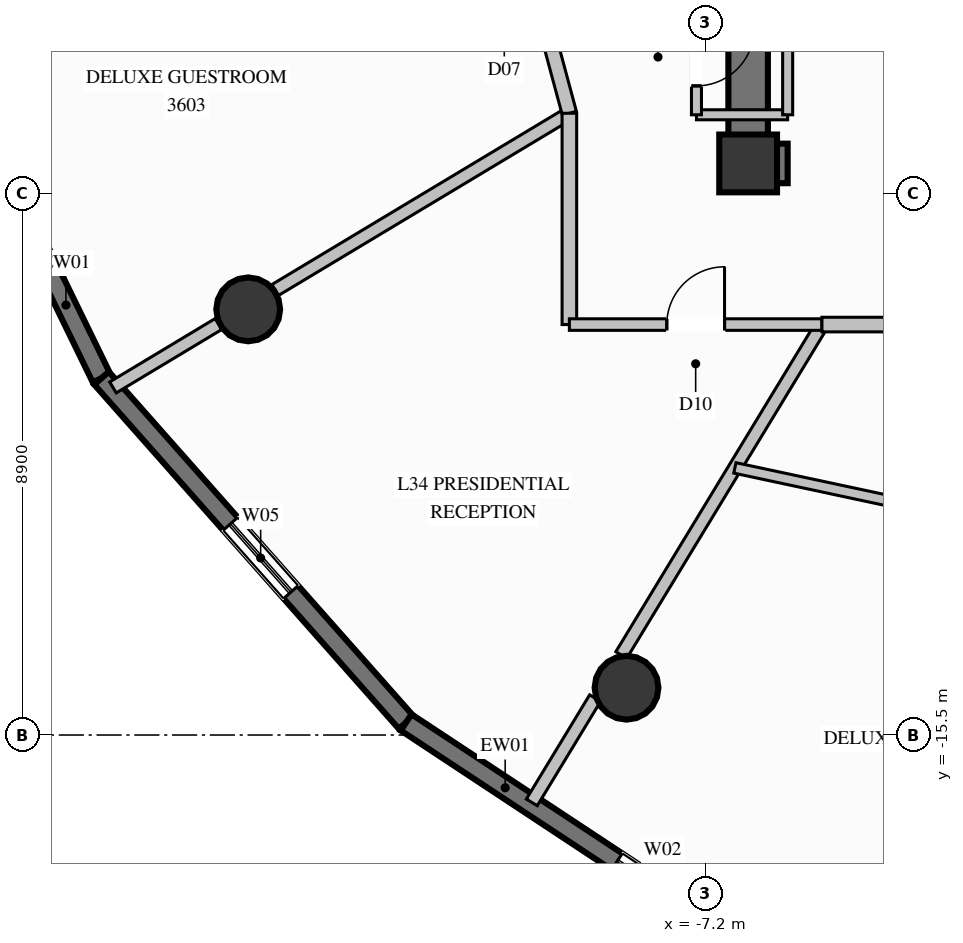
"""IFC4 building model, lengths in metres.
Left out: names, types, materials, properties, quantities, classifications, styles, units other than length and angle.
Written with IfcOpenShell. Run it as: python <this file> out.ifc"""

import sys

from ifc_helpers import new_model, si_unit, direction, frame, frame_2d, origin, origin_2d, place, context, subcontext, project, spatial, rectangle, circle, extrude, element, fill, save


model = new_model("IFC4")
c1 = context("Model", 3, precision=1e-05, world=origin(), true_north=direction((0.0, 1.0)))
c2 = subcontext(c1, "Body", "Model", "MODEL_VIEW")
j1 = project(units=[si_unit("LENGTHUNIT", "METRE"), si_unit("PLANEANGLEUNIT", "RADIAN")], contexts=[c1])
p1 = place(None, origin())
s1 = spatial("IfcSite", under=j1, at=p1, CompositionType="ELEMENT")
p2 = place(p1, origin())
s2 = spatial("IfcBuilding", under=s1, at=p2, CompositionType="ELEMENT")
p3 = place(p2, frame((0.0, 0.0, 135.0)))
s3 = spatial("IfcBuildingStorey", under=s2, at=p3, CompositionType="ELEMENT", Elevation=135.0)
p4 = place(p3, frame((-6.5, -6.1, 0.0), z_axis=(0.0, 0.0, 1.0), x_axis=(1.0, 0.0, 0.0)))
e1 = element("IfcColumn", 1, at=p4, inside=s3, PredefinedType="COLUMN", context=c2, shape_type="SweptSolid", body=[
    extrude(rectangle(XDim=0.95, YDim=0.95, at=origin_2d()), origin(), (0.0, 0.0, 1.0), 3.6),
])
p5 = place(p3, frame((-6.175, -6.1, 0.0), z_axis=(0.0, 0.0, 1.0), x_axis=(1.0, 0.0, 0.0)))
e2 = element("IfcWall", 2, at=p5, inside=s3, PredefinedType="SHEAR", context=c2, shape_type="SweptSolid", body=[
    extrude(rectangle(XDim=0.325, YDim=0.65, at=frame_2d((0.163, 0.0))), origin(), (0.0, 0.0, 1.0), 3.6),
])
p6 = place(p3, frame((-6.5, -6.425, 0.0), z_axis=(0.0, 0.0, 1.0), x_axis=(0.0, 1.0, 0.0)))
e3 = element("IfcWall", 3, at=p6, inside=s3, PredefinedType="SHEAR", context=c2, shape_type="SweptSolid", body=[
    extrude(rectangle(XDim=3.075, YDim=0.65, at=frame_2d((1.538, 0.0))), origin(), (0.0, 0.0, 1.0), 3.6),
])
for number, where, z_axis, x_axis in (
    (4, (-14.722, -8.5, 0.0), (0.0, 0.0, 1.0), (1.0, 0.0, 0.0)),
    (5, (-8.5, -14.722, 0.0), (0.0, 0.0, 1.0), (1.0, 0.0, 0.0)),
):
    element("IfcColumn", number, at=place(p3, frame(where, z_axis=z_axis, x_axis=x_axis)), inside=s3, PredefinedType="COLUMN", context=c2, shape_type="SweptSolid", body=[
        extrude(circle(Radius=0.525, at=origin_2d()), origin(), (0.0, 0.0, 1.0), 3.6),
    ])
p7 = place(p3, frame((-17.134, -9.631, 0.0), z_axis=(0.0, 0.0, 1.0), x_axis=(-0.438204261182, 0.898875422671, 0.0)))
e6 = element("IfcWall", 6, at=p7, inside=s3, PredefinedType="SOLIDWALL", context=c2, shape_type="SweptSolid", body=[
    extrude(rectangle(XDim=7.346, YDim=0.32, at=frame_2d((3.673, 0.0))), origin(), (0.0, 0.0, 1.0), 3.35),
])
p8 = place(p7, frame((2.923, 0.0, 0.85)))
e7 = element("IfcOpeningElement", 7, at=p8, cuts=e6, PredefinedType="OPENING", context=c2, shape_type="SweptSolid", body=[
    extrude(rectangle(XDim=1.5, YDim=1.2, at=frame_2d((0.75, 0.6))), frame((0.0, 0.17, 0.0), z_axis=(0.0, -1.0, 0.0), x_axis=(1.0, 0.0, 0.0)), (0.0, 0.0, 1.0), 0.34),
])
p9 = place(p3, frame((-12.125, -15.292, 0.0), z_axis=(0.0, 0.0, 1.0), x_axis=(-0.662672139557, 0.748909631033, 0.0)))
e8 = element("IfcWall", 8, at=p9, inside=s3, PredefinedType="SOLIDWALL", context=c2, shape_type="SweptSolid", body=[
    extrude(rectangle(XDim=7.559, YDim=0.32, at=frame_2d((3.779, 0.0))), origin(), (0.0, 0.0, 1.0), 3.35),
])
p10 = place(p9, frame((2.86, 0.0, 0.85)))
e9 = element("IfcOpeningElement", 9, at=p10, cuts=e8, PredefinedType="OPENING", context=c2, shape_type="SweptSolid", body=[
    extrude(rectangle(XDim=1.5, YDim=1.2, at=frame_2d((0.75, 0.6))), frame((0.0, 0.17, 0.0), z_axis=(0.0, -1.0, 0.0), x_axis=(1.0, 0.0, 0.0)), (0.0, 0.0, 1.0), 0.34),
])
p11 = place(p3, frame((-5.816, -19.456, 0.0), z_axis=(0.0, 0.0, 1.0), x_axis=(-0.834605249122, 0.550848507431, 0.0)))
e10 = element("IfcWall", 10, at=p11, inside=s3, PredefinedType="SOLIDWALL", context=c2, shape_type="SweptSolid", body=[
    extrude(rectangle(XDim=7.559, YDim=0.32, at=frame_2d((3.78, 0.0))), origin(), (0.0, 0.0, 1.0), 3.35),
])
p12 = place(p11, frame((1.605, 0.0, 0.35)))
e11 = element("IfcOpeningElement", 11, at=p12, cuts=e10, PredefinedType="OPENING", context=c2, shape_type="SweptSolid", body=[
    extrude(rectangle(XDim=1.8, YDim=2.6, at=frame_2d((0.9, 1.3))), frame((0.0, 0.17, 0.0), z_axis=(0.0, -1.0, 0.0), x_axis=(1.0, 0.0, 0.0)), (0.0, 0.0, 1.0), 0.34),
])
p13 = place(p3, frame((-7.35, -5.3, 0.0), z_axis=(0.0, 0.0, 1.0), x_axis=(1.0, 0.0, 0.0)))
e12 = element("IfcWall", 12, at=p13, inside=s3, PredefinedType="PARTITIONING", context=c2, shape_type="SweptSolid", body=[
    extrude(rectangle(XDim=1.5, YDim=0.165, at=frame_2d((0.75, 0.0))), origin(), (0.0, 0.0, 1.0), 2.435),
])
p14 = place(p3, frame((-5.85, -5.3, 0.0), z_axis=(0.0, 0.0, 1.0), x_axis=(0.0, 1.0, 0.0)))
e13 = element("IfcWall", 13, at=p14, inside=s3, PredefinedType="PARTITIONING", context=c2, shape_type="SweptSolid", body=[
    extrude(rectangle(XDim=1.9, YDim=0.165, at=frame_2d((0.95, 0.0))), origin(), (0.0, 0.0, 1.0), 2.435),
])
p15 = place(p3, frame((-7.35, -3.4, 0.0), z_axis=(0.0, 0.0, 1.0), x_axis=(0.0, -1.0, 0.0)))
e14 = element("IfcWall", 14, at=p15, inside=s3, PredefinedType="PARTITIONING", context=c2, shape_type="SweptSolid", body=[
    extrude(rectangle(XDim=1.9, YDim=0.165, at=frame_2d((0.95, 0.0))), origin(), (0.0, 0.0, 1.0), 3.35),
])
p16 = place(p15, frame((0.475, 0.0, 0.0)))
e15 = element("IfcOpeningElement", 15, at=p16, cuts=e14, PredefinedType="OPENING", context=c2, shape_type="SweptSolid", body=[
    extrude(rectangle(XDim=0.95, YDim=2.1, at=frame_2d((0.475, 1.05))), frame((0.0, 0.093, 0.0), z_axis=(0.0, -1.0, 0.0), x_axis=(1.0, 0.0, 0.0)), (0.0, 0.0, 1.0), 0.185),
])
p17 = place(p3, frame((-9.44, -5.275, 0.0), z_axis=(0.0, 0.0, 1.0), x_axis=(-0.857218051621, -0.514953601769, 0.0)))
e16 = element("IfcWall", 16, at=p17, inside=s3, PredefinedType="PARTITIONING", context=c2, shape_type="SweptSolid", body=[
    extrude(rectangle(XDim=5.645, YDim=0.21, at=frame_2d((2.823, 0.0))), origin(), (0.0, 0.0, 1.0), 2.717),
])
p18 = place(p3, frame((-15.211, -8.741, 0.0), z_axis=(0.0, 0.0, 1.0), x_axis=(-0.857077653739, -0.515187243108, 0.0)))
e17 = element("IfcWall", 17, at=p18, inside=s3, PredefinedType="PARTITIONING", context=c2, shape_type="SweptSolid", body=[
    extrude(rectangle(XDim=2.024, YDim=0.21, at=frame_2d((1.012, 0.0))), origin(), (0.0, 0.0, 1.0), 3.35),
])
p19 = place(p3, frame((-10.287, -2.129, 0.0), z_axis=(0.0, 0.0, 1.0), x_axis=(0.260021844471, -0.965602734253, 0.0)))
e18 = element("IfcWall", 18, at=p19, inside=s3, PredefinedType="PARTITIONING", context=c2, shape_type="SweptSolid", body=[
    extrude(rectangle(XDim=3.258, YDim=0.24, at=frame_2d((1.629, 0.0))), origin(), (0.0, 0.0, 1.0), 3.35),
])
p20 = place(p19, frame((1.129, 0.0, 0.0)))
e19 = element("IfcOpeningElement", 19, at=p20, cuts=e18, PredefinedType="OPENING", context=c2, shape_type="SweptSolid", body=[
    extrude(rectangle(XDim=1.0, YDim=2.2, at=frame_2d((0.5, 1.1))), frame((0.0, 0.13, 0.0), z_axis=(0.0, -1.0, 0.0), x_axis=(1.0, 0.0, 0.0)), (0.0, 0.0, 1.0), 0.26),
])
p21 = place(p3, frame((-5.286, -8.75, 0.0), z_axis=(0.0, 0.0, 1.0), x_axis=(-0.519068318579, -0.854732753934, 0.0)))
e20 = element("IfcWall", 20, at=p21, inside=s3, PredefinedType="PARTITIONING", context=c2, shape_type="SweptSolid", body=[
    extrude(rectangle(XDim=6.358, YDim=0.21, at=frame_2d((3.179, 0.0))), origin(), (0.0, 0.0, 1.0), 2.717),
])
p22 = place(p3, frame((-9.017, -14.894, 0.0), z_axis=(0.0, 0.0, 1.0), x_axis=(-0.519143332801, -0.854687194246, 0.0)))
e21 = element("IfcWall", 21, at=p22, inside=s3, PredefinedType="PARTITIONING", context=c2, shape_type="SweptSolid", body=[
    extrude(rectangle(XDim=2.005, YDim=0.21, at=frame_2d((1.003, 0.0))), origin(), (0.0, 0.0, 1.0), 3.35),
])
p23 = place(p3, frame((-9.44, -5.275, 0.0), z_axis=(0.0, 0.0, 1.0), x_axis=(0.0, -1.0, 0.0)))
e22 = element("IfcWall", 22, at=p23, inside=s3, PredefinedType="PARTITIONING", context=c2, shape_type="SweptSolid", body=[
    extrude(rectangle(XDim=3.475, YDim=0.24, at=frame_2d((1.738, 0.0))), origin(), (0.0, 0.0, 1.0), 3.35),
])
p24 = place(p3, frame((-9.44, -8.75, 0.0), z_axis=(0.0, 0.0, 1.0), x_axis=(1.0, 0.0, 0.0)))
e23 = element("IfcWall", 23, at=p24, inside=s3, PredefinedType="PARTITIONING", context=c2, shape_type="SweptSolid", body=[
    extrude(rectangle(XDim=4.154, YDim=0.19, at=frame_2d((2.077, 0.0))), origin(), (0.0, 0.0, 1.0), 3.35),
])
p25 = place(p24, frame((1.602, 0.0, 0.0)))
e24 = element("IfcOpeningElement", 24, at=p25, cuts=e23, PredefinedType="OPENING", context=c2, shape_type="SweptSolid", body=[
    extrude(rectangle(XDim=0.95, YDim=2.1, at=frame_2d((0.475, 1.05))), frame((0.0, 0.105, 0.0), z_axis=(0.0, -1.0, 0.0), x_axis=(1.0, 0.0, 0.0)), (0.0, 0.0, 1.0), 0.21),
])
p26 = place(p3, frame((-5.286, -8.75, 0.0), z_axis=(0.0, 0.0, 1.0), x_axis=(1.0, 0.0, 0.0)))
e25 = element("IfcWall", 25, at=p26, inside=s3, PredefinedType="PARTITIONING", context=c2, shape_type="SweptSolid", body=[
    extrude(rectangle(XDim=2.326, YDim=0.24, at=frame_2d((1.163, 0.0))), origin(), (0.0, 0.0, 1.0), 3.35),
])
p27 = place(p3, frame((-6.718, -11.107, 0.0), z_axis=(0.0, 0.0, 1.0), x_axis=(0.977878450695, -0.209173936394, 0.0)))
e26 = element("IfcWall", 26, at=p27, inside=s3, PredefinedType="PLUMBINGWALL", context=c2, shape_type="SweptSolid", body=[
    extrude(rectangle(XDim=3.146, YDim=0.175, at=frame_2d((1.573, 0.0))), origin(), (0.0, 0.0, 1.0), 3.35),
])
p28 = place(p10, origin())
e27 = element("IfcWindow", 27, at=p28, inside=s3, PartitioningType="SINGLE_PANEL", PredefinedType="WINDOW", context=c2, shape_type="SweptSolid", body=[
    extrude(rectangle(XDim=1.5, YDim=1.2, at=frame_2d((0.75, 0.6))), frame((0.0, 0.03, 0.0), z_axis=(0.0, -1.0, 0.0), x_axis=(1.0, 0.0, 0.0)), (0.0, 0.0, 1.0), 0.06),
])
fill(e9, e27)
p29 = place(p12, origin())
e28 = element("IfcWindow", 28, at=p29, inside=s3, PartitioningType="SINGLE_PANEL", PredefinedType="WINDOW", context=c2, shape_type="SweptSolid", body=[
    extrude(rectangle(XDim=1.8, YDim=2.6, at=frame_2d((0.9, 1.3))), frame((0.0, 0.03, 0.0), z_axis=(0.0, -1.0, 0.0), x_axis=(1.0, 0.0, 0.0)), (0.0, 0.0, 1.0), 0.06),
])
fill(e11, e28)
p30 = place(p16, origin())
e29 = element("IfcDoor", 29, at=p30, inside=s3, OperationType="SINGLE_SWING_LEFT", PredefinedType="DOOR", context=c2, shape_type="SweptSolid", body=[
    extrude(rectangle(XDim=0.95, YDim=2.1, at=frame_2d((0.475, 1.05))), frame((0.0, 0.025, 0.0), z_axis=(0.0, -1.0, 0.0), x_axis=(1.0, 0.0, 0.0)), (0.0, 0.0, 1.0), 0.05),
])
fill(e15, e29)
p31 = place(p25, origin())
e30 = element("IfcDoor", 30, at=p31, inside=s3, OperationType="SINGLE_SWING_RIGHT", PredefinedType="DOOR", context=c2, shape_type="SweptSolid", body=[
    extrude(rectangle(XDim=0.95, YDim=2.1, at=frame_2d((0.475, 1.05))), frame((0.0, 0.025, 0.0), z_axis=(0.0, -1.0, 0.0), x_axis=(1.0, 0.0, 0.0)), (0.0, 0.0, 1.0), 0.05),
])
fill(e24, e30)
save(model, sys.argv[1])
